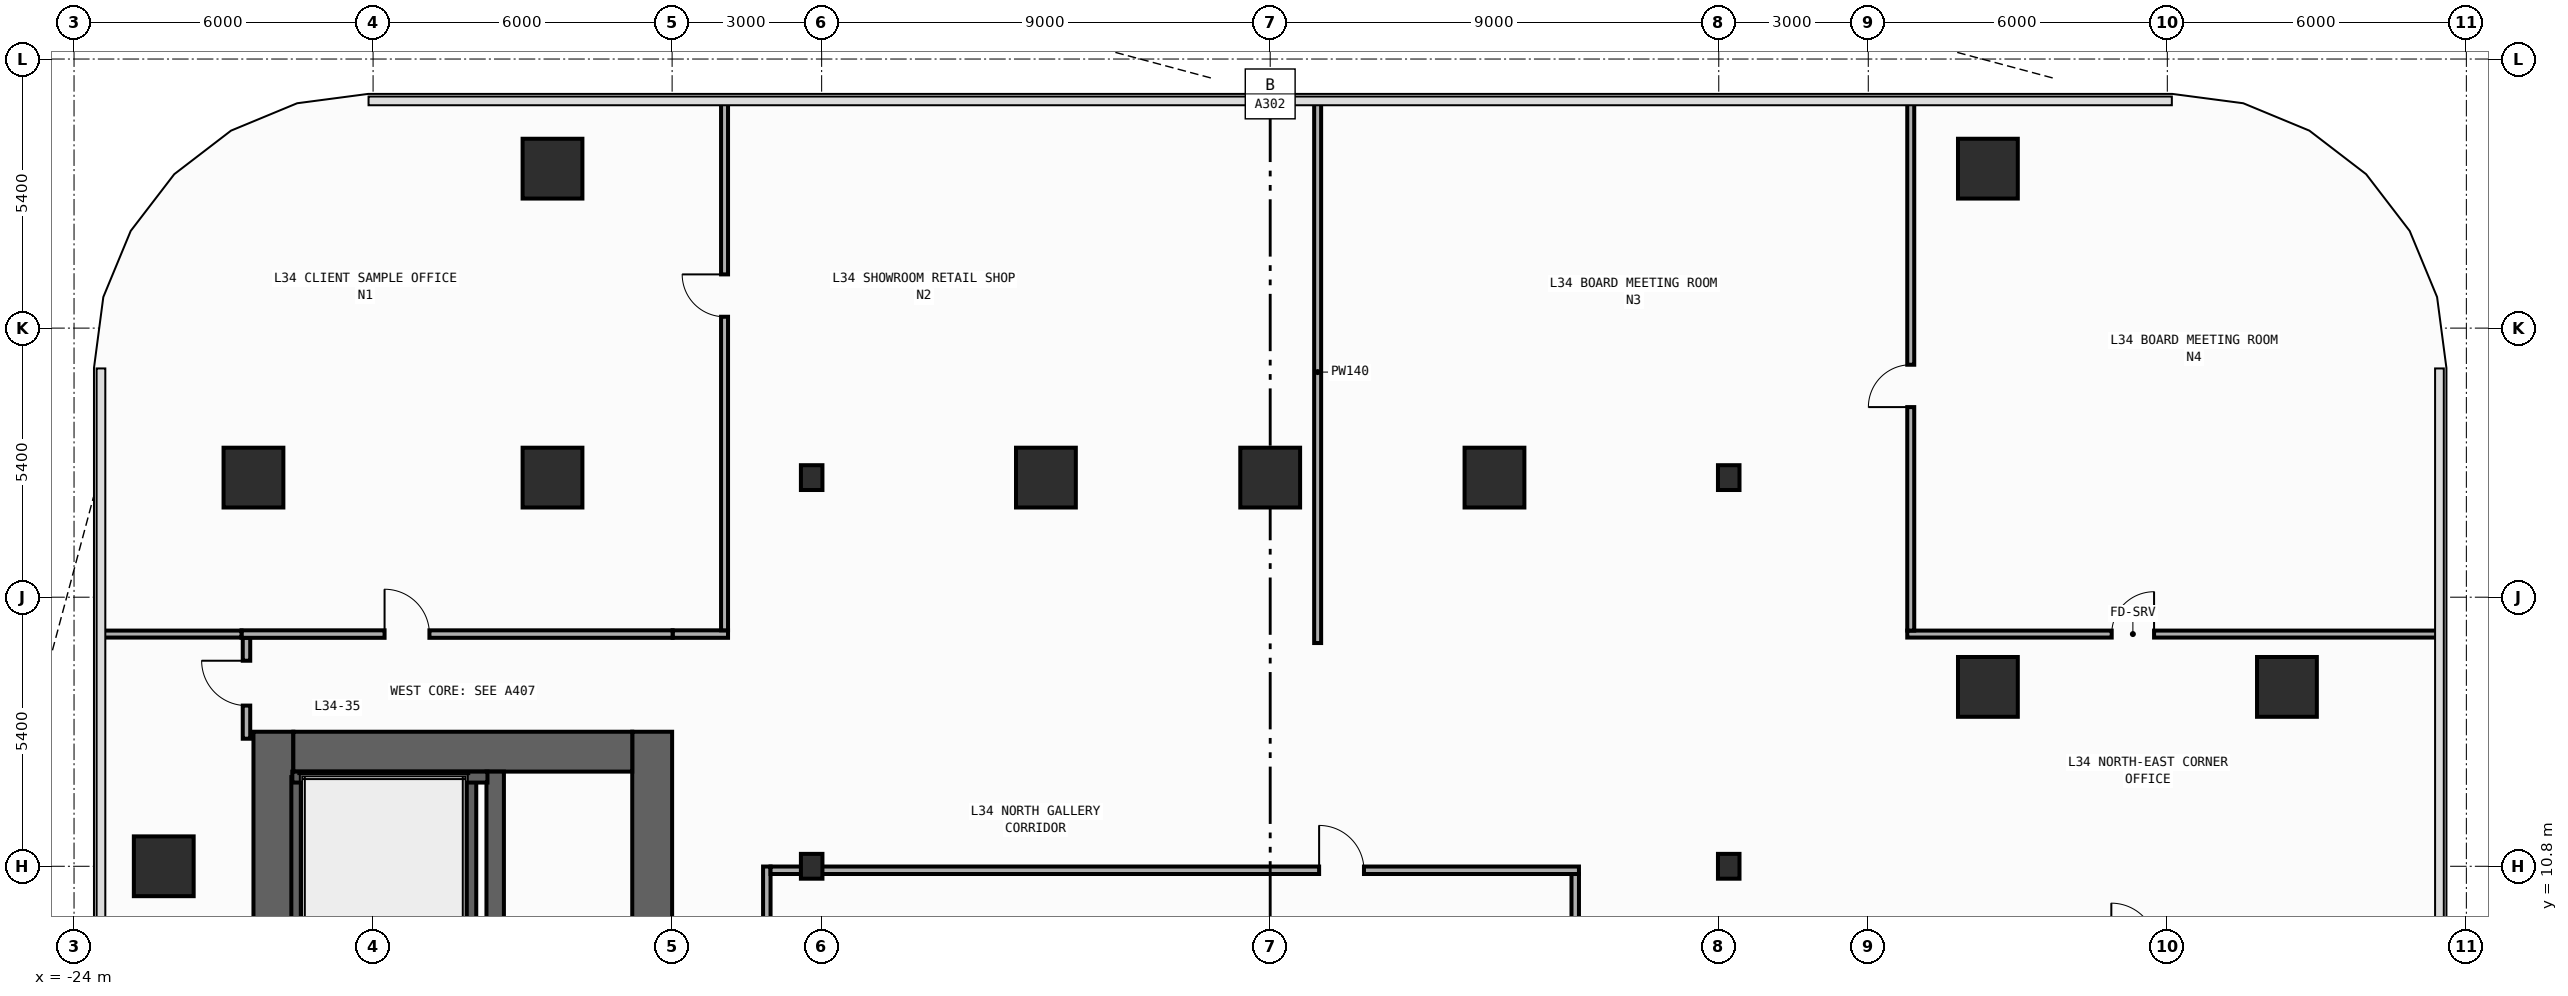
"""IFC4 building model, lengths in metres.
Left out: names, types, materials, properties, quantities, classifications, styles, units other than length and angle.
Written with IfcOpenShell. Run it as: python <this file> out.ifc"""

import sys

from ifc_helpers import new_model, si_unit, direction, frame, frame_2d, origin, origin_2d, place, context, subcontext, project, spatial, rectangle, i_section, extrude, element, fill, save


model = new_model("IFC4")
c1 = context("Model", 3, precision=1e-05, world=origin(), true_north=direction((0.0, 1.0)))
c2 = subcontext(c1, "Body", "Model", "MODEL_VIEW")
j1 = project(units=[si_unit("LENGTHUNIT", "METRE"), si_unit("PLANEANGLEUNIT", "RADIAN")], contexts=[c1])
p1 = place(None, origin())
s1 = spatial("IfcSite", under=j1, at=p1, CompositionType="ELEMENT")
p2 = place(p1, origin())
s2 = spatial("IfcBuilding", under=s1, at=p2, CompositionType="ELEMENT")
p3 = place(p2, frame((0.0, 0.0, 147.8)))
s3 = spatial("IfcBuildingStorey", under=s2, at=p3, CompositionType="ELEMENT", Elevation=147.8)
p4 = place(p3, frame((-20.0, -13.5, 0.0), z_axis=(0.0, 0.0, 1.0), x_axis=(0.0, 1.0, 0.0)))
e1 = element("IfcWall", 1, at=p4, inside=s3, PredefinedType="SHEAR", context=c2, shape_type="SweptSolid", body=[
    extrude(rectangle(XDim=27.0, YDim=0.8, at=frame_2d((13.5, 0.0))), origin(), (0.0, 0.0, 1.0), 3.85),
])
p5 = place(p3, frame((-12.4, -13.5, 0.0), z_axis=(0.0, 0.0, 1.0), x_axis=(0.0, 1.0, 0.0)))
e2 = element("IfcWall", 2, at=p5, inside=s3, PredefinedType="SHEAR", context=c2, shape_type="SweptSolid", body=[
    extrude(rectangle(XDim=27.0, YDim=0.8, at=frame_2d((13.5, 0.0))), origin(), (0.0, 0.0, 1.0), 3.85),
])
p6 = place(p5, frame((10.35, 0.0, 0.0)))
e3 = element("IfcOpeningElement", 3, at=p6, cuts=e2, PredefinedType="OPENING", context=c2, shape_type="SweptSolid", body=[
    extrude(rectangle(XDim=1.1, YDim=2.2, at=frame_2d((0.55, 1.1))), frame((0.0, 0.41, 0.0), z_axis=(0.0, -1.0, 0.0), x_axis=(1.0, 0.0, 0.0)), (0.0, 0.0, 1.0), 0.82),
])
p7 = place(p5, frame((7.15, 0.0, 0.0)))
e4 = element("IfcOpeningElement", 4, at=p7, cuts=e2, PredefinedType="OPENING", context=c2, shape_type="SweptSolid", body=[
    extrude(rectangle(XDim=1.1, YDim=2.2, at=frame_2d((0.55, 1.1))), frame((0.0, 0.41, 0.0), z_axis=(0.0, -1.0, 0.0), x_axis=(1.0, 0.0, 0.0)), (0.0, 0.0, 1.0), 0.82),
])
p8 = place(p5, frame((3.95, 0.0, 0.0)))
e5 = element("IfcOpeningElement", 5, at=p8, cuts=e2, PredefinedType="OPENING", context=c2, shape_type="SweptSolid", body=[
    extrude(rectangle(XDim=1.1, YDim=2.2, at=frame_2d((0.55, 1.1))), frame((0.0, 0.41, 0.0), z_axis=(0.0, -1.0, 0.0), x_axis=(1.0, 0.0, 0.0)), (0.0, 0.0, 1.0), 0.82),
])
p9 = place(p5, frame((15.175, 0.0, 0.0)))
e6 = element("IfcOpeningElement", 6, at=p9, cuts=e2, PredefinedType="OPENING", context=c2, shape_type="SweptSolid", body=[
    extrude(rectangle(XDim=0.85, YDim=2.1, at=frame_2d((0.425, 1.05))), frame((0.0, 0.41, 0.0), z_axis=(0.0, -1.0, 0.0), x_axis=(1.0, 0.0, 0.0)), (0.0, 0.0, 1.0), 0.82),
])
p10 = place(p5, frame((21.275, 0.0, 0.0)))
e7 = element("IfcOpeningElement", 7, at=p10, cuts=e2, PredefinedType="OPENING", context=c2, shape_type="SweptSolid", body=[
    extrude(rectangle(XDim=0.85, YDim=2.1, at=frame_2d((0.425, 1.05))), frame((0.0, 0.41, 0.0), z_axis=(0.0, -1.0, 0.0), x_axis=(1.0, 0.0, 0.0)), (0.0, 0.0, 1.0), 0.82),
])
p11 = place(p5, frame((12.725, 0.0, 0.0)))
e8 = element("IfcOpeningElement", 8, at=p11, cuts=e2, PredefinedType="OPENING", context=c2, shape_type="SweptSolid", body=[
    extrude(rectangle(XDim=1.15, YDim=2.2, at=frame_2d((0.575, 1.1))), frame((0.0, 0.41, 0.0), z_axis=(0.0, -1.0, 0.0), x_axis=(1.0, 0.0, 0.0)), (0.0, 0.0, 1.0), 0.82),
])
p12 = place(p5, frame((1.625, 0.0, 0.0)))
e9 = element("IfcOpeningElement", 9, at=p12, cuts=e2, PredefinedType="OPENING", context=c2, shape_type="SweptSolid", body=[
    extrude(rectangle(XDim=0.85, YDim=2.1, at=frame_2d((0.425, 1.05))), frame((0.0, 0.41, 0.0), z_axis=(0.0, -1.0, 0.0), x_axis=(1.0, 0.0, 0.0)), (0.0, 0.0, 1.0), 0.82),
])
p13 = place(p3, frame((-19.6, 13.1, 0.0), z_axis=(0.0, 0.0, 1.0), x_axis=(1.0, 0.0, 0.0)))
e10 = element("IfcWall", 10, at=p13, inside=s3, PredefinedType="SHEAR", context=c2, shape_type="SweptSolid", body=[
    extrude(rectangle(XDim=6.8, YDim=0.8, at=frame_2d((3.4, 0.0))), origin(), (0.0, 0.0, 1.0), 3.85),
])
p14 = place(p3, frame((-15.55, -12.7, 0.0), z_axis=(0.0, 0.0, 1.0), x_axis=(0.0, 1.0, 0.0)))
e11 = element("IfcWall", 11, at=p14, inside=s3, PredefinedType="SHEAR", context=c2, shape_type="SweptSolid", body=[
    extrude(rectangle(XDim=25.4, YDim=0.35, at=frame_2d((12.7, 0.0))), origin(), (0.0, 0.0, 1.0), 3.85),
])
p15 = place(p14, frame((11.925, 0.0, 0.0)))
e12 = element("IfcOpeningElement", 12, at=p15, cuts=e11, PredefinedType="OPENING", context=c2, shape_type="SweptSolid", body=[
    extrude(rectangle(XDim=1.15, YDim=2.2, at=frame_2d((0.575, 1.1))), frame((0.0, 0.185, 0.0), z_axis=(0.0, -1.0, 0.0), x_axis=(1.0, 0.0, 0.0)), (0.0, 0.0, 1.0), 0.37),
])
p16 = place(p14, frame((0.825, 0.0, 0.0)))
e13 = element("IfcOpeningElement", 13, at=p16, cuts=e11, PredefinedType="OPENING", context=c2, shape_type="SweptSolid", body=[
    extrude(rectangle(XDim=0.85, YDim=2.1, at=frame_2d((0.425, 1.05))), frame((0.0, 0.185, 0.0), z_axis=(0.0, -1.0, 0.0), x_axis=(1.0, 0.0, 0.0)), (0.0, 0.0, 1.0), 0.37),
])
for number, where, z_axis, x_axis in (
    (14, (-16.04, 1.29, 0.0), (0.0, 0.0, 1.0), (0.0, 1.0, 0.0)),
    (15, (-19.53, 1.29, 0.0), (0.0, 0.0, 1.0), (0.0, 1.0, 0.0)),
):
    element("IfcWall", number, at=place(p3, frame(where, z_axis=z_axis, x_axis=x_axis)), inside=s3, PredefinedType="SHEAR", context=c2, shape_type="SweptSolid", body=[
        extrude(rectangle(XDim=11.3, YDim=0.22, at=frame_2d((5.65, 0.0))), origin(), (0.0, 0.0, 1.0), 3.85),
    ])
p17 = place(p3, frame((-19.62, 12.59, 0.0), z_axis=(0.0, 0.0, 1.0), x_axis=(1.0, 0.0, 0.0)))
e16 = element("IfcWall", 16, at=p17, inside=s3, PredefinedType="SHEAR", context=c2, shape_type="SweptSolid", body=[
    extrude(rectangle(XDim=3.915, YDim=0.22, at=frame_2d((1.958, 0.0))), origin(), (0.0, 0.0, 1.0), 3.85),
])
for number, where, z_axis, x_axis in (
    (17, (-9.2, 10.8, 0.0), (0.0, 0.0, 1.0), (1.0, 0.0, 0.0)),
    (18, (-9.2, 18.6, 0.0), (0.0, 0.0, 1.0), (1.0, 0.0, 0.0)),
    (19, (9.2, 10.8, 0.0), (0.0, 0.0, 1.0), (1.0, 0.0, 0.0)),
    (20, (9.2, 18.6, 0.0), (0.0, 0.0, 1.0), (1.0, 0.0, 0.0)),
):
    element("IfcColumn", number, at=place(p3, frame(where, z_axis=z_axis, x_axis=x_axis)), inside=s3, PredefinedType="COLUMN", context=c2, shape_type="SweptSolid", body=[
        extrude(i_section(OverallWidth=0.432, OverallDepth=0.498, WebThickness=0.045, FlangeThickness=0.07, FilletRadius=0.022, at=origin_2d()), origin(), (0.0, 0.0, 1.0), 4.2),
    ])
for number, where, z_axis, x_axis in (
    (21, (-20.4, 18.6, 0.0), (0.0, 0.0, 1.0), (1.0, 0.0, 0.0)),
    (22, (20.4, 14.4, 0.0), (0.0, 0.0, 1.0), (1.0, 0.0, 0.0)),
    (23, (-14.4, 18.6, 0.0), (0.0, 0.0, 1.0), (1.0, 0.0, 0.0)),
    (24, (14.4, 14.4, 0.0), (0.0, 0.0, 1.0), (1.0, 0.0, 0.0)),
    (25, (-4.5, 18.6, 0.0), (0.0, 0.0, 1.0), (1.0, 0.0, 0.0)),
    (26, (0.0, 18.6, 0.0), (0.0, 0.0, 1.0), (1.0, 0.0, 0.0)),
    (27, (4.5, 18.6, 0.0), (0.0, 0.0, 1.0), (1.0, 0.0, 0.0)),
    (28, (-22.2, 10.8, 0.0), (0.0, 0.0, 1.0), (1.0, 0.0, 0.0)),
    (29, (-14.4, 24.8, 0.0), (0.0, 0.0, 1.0), (1.0, 0.0, 0.0)),
    (30, (14.4, 24.8, 0.0), (0.0, 0.0, 1.0), (1.0, 0.0, 0.0)),
):
    element("IfcColumn", number, at=place(p3, frame(where, z_axis=z_axis, x_axis=x_axis)), inside=s3, PredefinedType="COLUMN", context=c2, shape_type="SweptSolid", body=[
        extrude(rectangle(XDim=1.2, YDim=1.2, at=origin_2d()), origin(), (0.0, 0.0, 1.0), 4.2),
    ])
p18 = place(p3, frame((-11.99, 15.46, 0.0), z_axis=(0.0, 0.0, 1.0), x_axis=(1.0, 0.0, 0.0)))
e31 = element("IfcWall", 31, at=p18, inside=s3, PredefinedType="PARTITIONING", context=c2, shape_type="SweptSolid", body=[
    extrude(rectangle(XDim=1.112, YDim=0.15, at=frame_2d((0.556, 0.0))), origin(), (0.0, 0.0, 1.0), 3.85),
])
p19 = place(p3, frame((-10.1, -7.12, 0.0), z_axis=(0.0, 0.0, 1.0), x_axis=(0.0, 1.0, 0.0)))
e32 = element("IfcWall", 32, at=p19, inside=s3, PredefinedType="PARTITIONING", context=c2, shape_type="SweptSolid", body=[
    extrude(rectangle(XDim=17.915, YDim=0.15, at=frame_2d((8.958, 0.0))), origin(), (0.0, 0.0, 1.0), 3.85),
])
p20 = place(p19, frame((1.265, 0.0, 0.0)))
e33 = element("IfcOpeningElement", 33, at=p20, cuts=e32, PredefinedType="OPENING", context=c2, shape_type="SweptSolid", body=[
    extrude(rectangle(XDim=0.9, YDim=2.15, at=frame_2d((0.45, 1.075))), frame((0.0, 0.085, 0.0), z_axis=(0.0, -1.0, 0.0), x_axis=(1.0, 0.0, 0.0)), (0.0, 0.0, 1.0), 0.17),
])
p21 = place(p3, frame((-10.025, 10.72, 0.0), z_axis=(0.0, 0.0, 1.0), x_axis=(1.0, 0.0, 0.0)))
e34 = element("IfcWall", 34, at=p21, inside=s3, PredefinedType="PARTITIONING", context=c2, shape_type="SweptSolid", body=[
    extrude(rectangle(XDim=16.22, YDim=0.15, at=frame_2d((8.11, 0.0))), origin(), (0.0, 0.0, 1.0), 3.15),
])
p22 = place(p21, frame((11.007, 0.0, 0.0)))
e35 = element("IfcOpeningElement", 35, at=p22, cuts=e34, PredefinedType="OPENING", context=c2, shape_type="SweptSolid", body=[
    extrude(rectangle(XDim=0.9, YDim=2.15, at=frame_2d((0.45, 1.075))), frame((0.0, 0.085, 0.0), z_axis=(0.0, -1.0, 0.0), x_axis=(1.0, 0.0, 0.0)), (0.0, 0.0, 1.0), 0.17),
])
p23 = place(p3, frame((6.12, -7.28, 0.0), z_axis=(0.0, 0.0, 1.0), x_axis=(0.0, 1.0, 0.0)))
e36 = element("IfcWall", 36, at=p23, inside=s3, PredefinedType="PARTITIONING", context=c2, shape_type="SweptSolid", body=[
    extrude(rectangle(XDim=17.925, YDim=0.15, at=frame_2d((8.962, 0.0))), origin(), (0.0, 0.0, 1.0), 3.85),
])
p24 = place(p23, frame((1.467, 0.0, 0.0)))
e37 = element("IfcOpeningElement", 37, at=p24, cuts=e36, PredefinedType="OPENING", context=c2, shape_type="SweptSolid", body=[
    extrude(rectangle(XDim=0.9, YDim=2.15, at=frame_2d((0.45, 1.075))), frame((0.0, 0.085, 0.0), z_axis=(0.0, -1.0, 0.0), x_axis=(1.0, 0.0, 0.0)), (0.0, 0.0, 1.0), 0.17),
])
p25 = place(p3, frame((-20.54, 13.36, 0.0), z_axis=(0.0, 0.0, 1.0), x_axis=(0.0, 1.0, 0.0)))
e38 = element("IfcWall", 38, at=p25, inside=s3, PredefinedType="PARTITIONING", context=c2, shape_type="SweptSolid", body=[
    extrude(rectangle(XDim=2.025, YDim=0.15, at=frame_2d((1.012, 0.0))), origin(), (0.0, 0.0, 1.0), 3.85),
])
p26 = place(p25, frame((0.665, 0.0, 0.0)))
e39 = element("IfcOpeningElement", 39, at=p26, cuts=e38, PredefinedType="OPENING", context=c2, shape_type="SweptSolid", body=[
    extrude(rectangle(XDim=0.9, YDim=2.15, at=frame_2d((0.45, 1.075))), frame((0.0, 0.085, 0.0), z_axis=(0.0, -1.0, 0.0), x_axis=(1.0, 0.0, 0.0)), (0.0, 0.0, 1.0), 0.17),
])
p27 = place(p3, frame((-20.64, 15.46, 0.0), z_axis=(0.0, 0.0, 1.0), x_axis=(1.0, 0.0, 0.0)))
e40 = element("IfcWall", 40, at=p27, inside=s3, PredefinedType="PARTITIONING", context=c2, shape_type="SweptSolid", body=[
    extrude(rectangle(XDim=8.65, YDim=0.15, at=frame_2d((4.325, 0.0))), origin(), (0.0, 0.0, 1.0), 3.85),
])
p28 = place(p27, frame((2.871, 0.0, 0.0)))
e41 = element("IfcOpeningElement", 41, at=p28, cuts=e40, PredefinedType="OPENING", context=c2, shape_type="SweptSolid", body=[
    extrude(rectangle(XDim=0.9, YDim=2.15, at=frame_2d((0.45, 1.075))), frame((0.0, 0.085, 0.0), z_axis=(0.0, -1.0, 0.0), x_axis=(1.0, 0.0, 0.0)), (0.0, 0.0, 1.0), 0.17),
])
p29 = place(p3, frame((-23.455, 15.46, 0.0), z_axis=(0.0, 0.0, 1.0), x_axis=(1.0, 0.0, 0.0)))
e42 = element("IfcWall", 42, at=p29, inside=s3, PredefinedType="PARTITIONING", context=c2, shape_type="SweptSolid", body=[
    extrude(rectangle(XDim=2.815, YDim=0.14, at=frame_2d((1.408, 0.0))), origin(), (0.0, 0.0, 1.0), 3.85),
])
p30 = place(p3, frame((12.782, 15.46, 0.0), z_axis=(0.0, 0.0, 1.0), x_axis=(1.0, 0.0, 0.0)))
e43 = element("IfcWall", 43, at=p30, inside=s3, PredefinedType="PARTITIONING", context=c2, shape_type="SweptSolid", body=[
    extrude(rectangle(XDim=10.673, YDim=0.14, at=frame_2d((5.336, 0.0))), origin(), (0.0, 0.0, 1.0), 3.85),
])
p31 = place(p30, frame((4.102, 0.0, 0.0)))
e44 = element("IfcOpeningElement", 44, at=p31, cuts=e43, PredefinedType="OPENING", context=c2, shape_type="SweptSolid", body=[
    extrude(rectangle(XDim=0.85, YDim=2.1, at=frame_2d((0.425, 1.05))), frame((0.0, 0.08, 0.0), z_axis=(0.0, -1.0, 0.0), x_axis=(1.0, 0.0, 0.0)), (0.0, 0.0, 1.0), 0.16),
])
p32 = place(p3, frame((-10.948, 15.535, 0.0), z_axis=(0.0, 0.0, 1.0), x_axis=(0.0, 1.0, 0.0)))
e45 = element("IfcWall", 45, at=p32, inside=s3, PredefinedType="PARTITIONING", context=c2, shape_type="SweptSolid", body=[
    extrude(rectangle(XDim=10.62, YDim=0.14, at=frame_2d((5.31, 0.0))), origin(), (0.0, 0.0, 1.0), 3.85),
])
p33 = place(p32, frame((6.293, 0.0, 0.0)))
e46 = element("IfcOpeningElement", 46, at=p33, cuts=e45, PredefinedType="OPENING", context=c2, shape_type="SweptSolid", body=[
    extrude(rectangle(XDim=0.85, YDim=2.1, at=frame_2d((0.425, 1.05))), frame((0.0, 0.08, 0.0), z_axis=(0.0, -1.0, 0.0), x_axis=(1.0, 0.0, 0.0)), (0.0, 0.0, 1.0), 0.16),
])
p34 = place(p3, frame((0.952, 15.28, 0.0), z_axis=(0.0, 0.0, 1.0), x_axis=(0.0, 1.0, 0.0)))
e47 = element("IfcWall", 47, at=p34, inside=s3, PredefinedType="PARTITIONING", context=c2, shape_type="SweptSolid", body=[
    extrude(rectangle(XDim=10.875, YDim=0.14, at=frame_2d((5.438, 0.0))), origin(), (0.0, 0.0, 1.0), 3.85),
])
p35 = place(p3, frame((12.852, 15.53, 0.0), z_axis=(0.0, 0.0, 1.0), x_axis=(0.0, 1.0, 0.0)))
e48 = element("IfcWall", 48, at=p35, inside=s3, PredefinedType="PARTITIONING", context=c2, shape_type="SweptSolid", body=[
    extrude(rectangle(XDim=10.625, YDim=0.14, at=frame_2d((5.312, 0.0))), origin(), (0.0, 0.0, 1.0), 3.85),
])
p36 = place(p35, frame((4.485, 0.0, 0.0)))
e49 = element("IfcOpeningElement", 49, at=p36, cuts=e48, PredefinedType="OPENING", context=c2, shape_type="SweptSolid", body=[
    extrude(rectangle(XDim=0.85, YDim=2.1, at=frame_2d((0.425, 1.05))), frame((0.0, 0.08, 0.0), z_axis=(0.0, -1.0, 0.0), x_axis=(1.0, 0.0, 0.0)), (0.0, 0.0, 1.0), 0.16),
])
p37 = place(p22, origin())
e50 = element("IfcDoor", 50, at=p37, inside=s3, OperationType="SINGLE_SWING_LEFT", PredefinedType="DOOR", context=c2, shape_type="SweptSolid", body=[
    extrude(rectangle(XDim=0.9, YDim=2.15, at=frame_2d((0.45, 1.075))), frame((0.0, 0.025, 0.0), z_axis=(0.0, -1.0, 0.0), x_axis=(1.0, 0.0, 0.0)), (0.0, 0.0, 1.0), 0.05),
])
fill(e35, e50)
p38 = place(p26, origin())
e51 = element("IfcDoor", 51, at=p38, inside=s3, OperationType="SINGLE_SWING_RIGHT", PredefinedType="DOOR", context=c2, shape_type="SweptSolid", body=[
    extrude(rectangle(XDim=0.9, YDim=2.15, at=frame_2d((0.45, 1.075))), frame((0.0, 0.025, 0.0), z_axis=(0.0, -1.0, 0.0), x_axis=(1.0, 0.0, 0.0)), (0.0, 0.0, 1.0), 0.05),
])
fill(e39, e51)
p39 = place(p28, origin())
e52 = element("IfcDoor", 52, at=p39, inside=s3, OperationType="SINGLE_SWING_LEFT", PredefinedType="DOOR", context=c2, shape_type="SweptSolid", body=[
    extrude(rectangle(XDim=0.9, YDim=2.15, at=frame_2d((0.45, 1.075))), frame((0.0, 0.025, 0.0), z_axis=(0.0, -1.0, 0.0), x_axis=(1.0, 0.0, 0.0)), (0.0, 0.0, 1.0), 0.05),
])
fill(e41, e52)
p40 = place(p31, origin())
e53 = element("IfcDoor", 53, at=p40, inside=s3, OperationType="SINGLE_SWING_RIGHT", PredefinedType="DOOR", context=c2, shape_type="SweptSolid", body=[
    extrude(rectangle(XDim=0.85, YDim=2.1, at=frame_2d((0.425, 1.05))), frame((0.0, 0.025, 0.0), z_axis=(0.0, -1.0, 0.0), x_axis=(1.0, 0.0, 0.0)), (0.0, 0.0, 1.0), 0.05),
])
fill(e44, e53)
p41 = place(p36, origin())
e54 = element("IfcDoor", 54, at=p41, inside=s3, OperationType="SINGLE_SWING_LEFT", PredefinedType="DOOR", context=c2, shape_type="SweptSolid", body=[
    extrude(rectangle(XDim=0.85, YDim=2.1, at=frame_2d((0.425, 1.05))), frame((0.0, 0.025, 0.0), z_axis=(0.0, -1.0, 0.0), x_axis=(1.0, 0.0, 0.0)), (0.0, 0.0, 1.0), 0.05),
])
fill(e49, e54)
p42 = place(p33, origin())
e55 = element("IfcDoor", 55, at=p42, inside=s3, OperationType="SINGLE_SWING_RIGHT", PredefinedType="DOOR", context=c2, shape_type="SweptSolid", body=[
    extrude(rectangle(XDim=0.85, YDim=2.1, at=frame_2d((0.425, 1.05))), frame((0.0, 0.025, 0.0), z_axis=(0.0, -1.0, 0.0), x_axis=(1.0, 0.0, 0.0)), (0.0, 0.0, 1.0), 0.05),
])
fill(e46, e55)
save(model, sys.argv[1])
